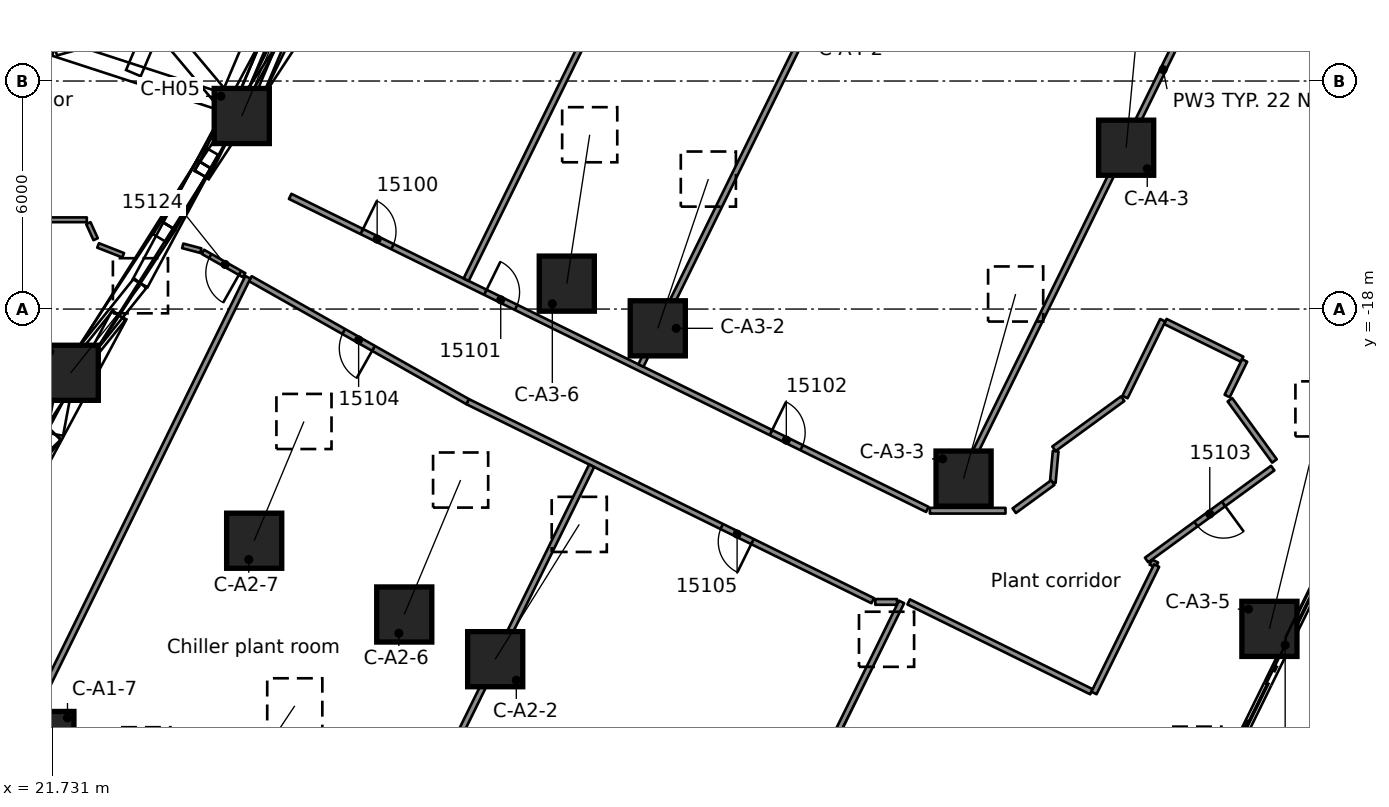
"""IFC4 building model, lengths in metres.
Left out: names, types, materials, properties, quantities, classifications, styles, units other than length and angle.
Written with IfcOpenShell. Run it as: python <this file> out.ifc"""

import sys

from ifc_helpers import new_model, si_unit, direction, frame, frame_2d, origin, origin_2d, place, context, subcontext, project, spatial, rectangle, extrude, element, fill, save


model = new_model("IFC4")
c1 = context("Model", 3, precision=1e-05, world=origin(), true_north=direction((0.0, 1.0)))
c2 = subcontext(c1, "Body", "Model", "MODEL_VIEW")
j1 = project(units=[si_unit("LENGTHUNIT", "METRE"), si_unit("PLANEANGLEUNIT", "RADIAN")], contexts=[c1])
p1 = place(None, origin())
s1 = spatial("IfcSite", under=j1, at=p1, CompositionType="ELEMENT")
p2 = place(p1, origin())
s2 = spatial("IfcBuilding", under=s1, at=p2, CompositionType="ELEMENT")
p3 = place(p2, frame((0.0, 0.0, 76.3)))
s3 = spatial("IfcBuildingStorey", under=s2, at=p3, CompositionType="ELEMENT", Elevation=76.3)
p4 = place(p3, frame((26.066, -31.518, 0.539), z_axis=(0.412094939361, 0.619345928653, 0.668272685072), x_axis=(-0.832547748734, 0.553953288716, 0.0)))
e1 = element("IfcColumn", 1, at=p4, inside=s3, PredefinedType="COLUMN", context=c2, shape_type="SweptSolid", body=[
    extrude(rectangle(XDim=1.45, YDim=1.45, at=origin_2d()), origin(), (0.0, 0.0, 1.0), 4.97),
])
p5 = place(p3, frame((21.578, -29.313, 0.425), z_axis=(0.579058536629, -0.094690218571, 0.809768469172), x_axis=(0.161380983903, 0.986892181565, 0.0)))
e2 = element("IfcColumn", 2, at=p5, inside=s3, PredefinedType="COLUMN", context=c2, shape_type="SweptSolid", body=[
    extrude(rectangle(XDim=1.45, YDim=1.45, at=origin_2d()), origin(), (0.0, 0.0, 1.0), 4.383),
])
p6 = place(p3, frame((33.388, -27.213, 0.572), z_axis=(0.417502902057, 0.669405381424, 0.614481702001), x_axis=(-0.848496661311, 0.529200732939, 0.0)))
e3 = element("IfcColumn", 3, at=p6, inside=s3, PredefinedType="COLUMN", context=c2, shape_type="SweptSolid", body=[
    extrude(rectangle(XDim=1.45, YDim=1.45, at=origin_2d()), origin(), (0.0, 0.0, 1.0), 5.299),
])
p7 = place(p3, frame((41.436, -31.167, 0.612), z_axis=(0.379249735907, 0.754795861111, 0.5352128977), x_axis=(-0.893548583897, 0.448966511241, 0.0)))
e4 = element("IfcColumn", 4, at=p7, inside=s3, PredefinedType="COLUMN", context=c2, shape_type="SweptSolid", body=[
    extrude(rectangle(XDim=1.45, YDim=1.45, at=origin_2d()), origin(), (0.0, 0.0, 1.0), 5.933),
])
p8 = place(p3, frame((30.995, -26.037, 0.55), z_axis=(0.293015861637, 0.699108637939, 0.652218381517), x_axis=(-0.922269042928, 0.386548590032, 0.0)))
e5 = element("IfcColumn", 5, at=p8, inside=s3, PredefinedType="COLUMN", context=c2, shape_type="SweptSolid", body=[
    extrude(rectangle(XDim=1.45, YDim=1.45, at=origin_2d()), origin(), (0.0, 0.0, 1.0), 5.061),
])
p9 = place(p3, frame((27.046, -24.096, 0.515), z_axis=(0.273638788717, 0.655437821725, 0.703933999152), x_axis=(-0.922806926199, 0.38526273757, 0.0)))
e6 = element("IfcColumn", 6, at=p9, inside=s3, PredefinedType="COLUMN", context=c2, shape_type="SweptSolid", body=[
    extrude(rectangle(XDim=1.45, YDim=1.45, at=origin_2d()), origin(), (0.0, 0.0, 1.0), 4.788),
])
p10 = place(p3, frame((37.666, -18.507, 0.57), z_axis=(0.252347690402, 0.744499743234, 0.618094471318), x_axis=(-0.947075588551, 0.321010637785, 0.0)))
e7 = element("IfcColumn", 7, at=p10, inside=s3, PredefinedType="COLUMN", context=c2, shape_type="SweptSolid", body=[
    extrude(rectangle(XDim=1.45, YDim=1.45, at=origin_2d()), origin(), (0.0, 0.0, 1.0), 5.275),
])
p11 = place(p3, frame((45.713, -22.461, 0.614), z_axis=(0.229855301875, 0.814814927922, 0.532205950207), x_axis=(-0.962438656011, 0.27149923281, 0.0)))
e8 = element("IfcColumn", 8, at=p11, inside=s3, PredefinedType="COLUMN", context=c2, shape_type="SweptSolid", body=[
    extrude(rectangle(XDim=1.45, YDim=1.45, at=origin_2d()), origin(), (0.0, 0.0, 1.0), 5.961),
])
p12 = place(p3, frame((53.761, -26.415, 0.642), z_axis=(0.209585713047, 0.861004693278, 0.463405596686), x_axis=(-0.971628161039, 0.236513671223, 0.0)))
e9 = element("IfcColumn", 9, at=p12, inside=s3, PredefinedType="COLUMN", context=c2, shape_type="SweptSolid", body=[
    extrude(rectangle(XDim=1.45, YDim=1.45, at=origin_2d()), origin(), (0.0, 0.0, 1.0), 6.722),
])
p13 = place(p3, frame((35.272, -17.331, 0.558), z_axis=(0.117156658899, 0.761186259922, 0.637863461081), x_axis=(-0.988361727552, 0.152121975764, 0.0)))
e10 = element("IfcColumn", 10, at=p13, inside=s3, PredefinedType="COLUMN", context=c2, shape_type="SweptSolid", body=[
    extrude(rectangle(XDim=1.45, YDim=1.45, at=origin_2d()), origin(), (0.0, 0.0, 1.0), 5.147),
])
p14 = place(p3, frame((49.991, -13.755, 0.622), z_axis=(0.07971925986, 0.853708499253, 0.514613095354), x_axis=(-0.995668399725, 0.092975468748, 0.0)))
e11 = element("IfcColumn", 11, at=p14, inside=s3, PredefinedType="COLUMN", context=c2, shape_type="SweptSolid", body=[
    extrude(rectangle(XDim=1.45, YDim=1.45, at=origin_2d()), origin(), (0.0, 0.0, 1.0), 6.134),
])
p15 = place(p3, frame((26.719, -12.92, 0.469), z_axis=(0.252280476656, 0.595306617304, 0.762866038366), x_axis=(-0.920733990351, 0.390190875101, 0.0)))
e12 = element("IfcColumn", 12, at=p15, inside=s3, PredefinedType="COLUMN", context=c2, shape_type="SweptSolid", body=[
    extrude(rectangle(XDim=1.45, YDim=1.45, at=origin_2d()), origin(), (0.0, 0.0, 1.0), 4.539),
])
p16 = place(p3, frame((22.219, -19.677, 0.469), z_axis=(0.404114198636, 0.504604790097, 0.762932316967), x_axis=(-0.780543967772, 0.625100883358, 0.0)))
e13 = element("IfcColumn", 13, at=p16, inside=s3, PredefinedType="COLUMN", context=c2, shape_type="SweptSolid", body=[
    extrude(rectangle(XDim=1.45, YDim=1.45, at=origin_2d()), origin(), (0.0, 0.0, 1.0), 4.538),
])
p17 = place(p3, frame((22.682, -15.739, 0.0), z_axis=(0.0, 0.0, 1.0), x_axis=(0.413486242538, -0.910510366351, 0.0)))
e14 = element("IfcWall", 14, at=p17, inside=s3, PredefinedType="PARTITIONING", context=c2, shape_type="SweptSolid", body=[
    extrude(rectangle(XDim=0.465, YDim=0.125, at=frame_2d((0.232, 0.0))), origin(), (0.0, 0.0, 1.0), 3.98),
])
p18 = place(p3, frame((53.894, -21.997, 0.0), z_axis=(0.0, 0.0, 1.0), x_axis=(-0.588776759567, 0.808295693044, 0.0)))
e15 = element("IfcWall", 15, at=p18, inside=s3, PredefinedType="PARTITIONING", context=c2, shape_type="SweptSolid", body=[
    extrude(rectangle(XDim=1.991, YDim=0.15, at=frame_2d((0.995, 0.0))), origin(), (0.0, 0.0, 1.0), 3.98),
])
p19 = place(p3, frame((48.136, -21.739, 0.0), z_axis=(0.0, 0.0, 1.0), x_axis=(-0.091330059121, -0.995820676779, 0.0)))
e16 = element("IfcWall", 16, at=p19, inside=s3, PredefinedType="PARTITIONING", context=c2, shape_type="SweptSolid", body=[
    extrude(rectangle(XDim=0.831, YDim=0.15, at=frame_2d((0.416, 0.0))), origin(), (0.0, 0.0, 1.0), 3.98),
])
p20 = place(p3, frame((26.782, -17.11, 0.0), z_axis=(0.0, 0.0, 1.0), x_axis=(-0.869921591707, 0.493190048847, 0.0)))
e17 = element("IfcWall", 17, at=p20, inside=s3, PredefinedType="PARTITIONING", context=c2, shape_type="SweptSolid", body=[
    extrude(rectangle(XDim=1.25, YDim=0.125, at=frame_2d((0.625, 0.0))), origin(), (0.0, 0.0, 1.0), 3.98),
])
p21 = place(p20, frame((0.125, 0.0, 0.0)))
e18 = element("IfcOpeningElement", 18, at=p21, cuts=e17, PredefinedType="OPENING", context=c2, shape_type="SweptSolid", body=[
    extrude(rectangle(XDim=0.9, YDim=2.1, at=frame_2d((0.45, 1.05))), frame((0.0, 0.073, 0.0), z_axis=(0.0, -1.0, 0.0), x_axis=(1.0, 0.0, 0.0)), (0.0, 0.0, 1.0), 0.145),
])
p22 = place(p3, frame((32.666, -20.438, 0.0), z_axis=(0.0, 0.0, 1.0), x_axis=(-0.870308211119, 0.4925074798, 0.0)))
e19 = element("IfcWall", 19, at=p22, inside=s3, PredefinedType="PARTITIONING", context=c2, shape_type="SweptSolid", body=[
    extrude(rectangle(XDim=6.575, YDim=0.15, at=frame_2d((3.287, 0.0))), origin(), (0.0, 0.0, 1.0), 3.98),
])
p23 = place(p22, frame((2.85, 0.0, 0.0)))
e20 = element("IfcOpeningElement", 20, at=p23, cuts=e19, PredefinedType="OPENING", context=c2, shape_type="SweptSolid", body=[
    extrude(rectangle(XDim=0.9, YDim=2.1, at=frame_2d((0.45, 1.05))), frame((0.0, 0.085, 0.0), z_axis=(0.0, -1.0, 0.0), x_axis=(1.0, 0.0, 0.0)), (0.0, 0.0, 1.0), 0.17),
])
p24 = place(p3, frame((43.321, -25.673, 0.0), z_axis=(0.0, 0.0, 1.0), x_axis=(-0.897519057595, 0.440975669684, 0.0)))
e21 = element("IfcWall", 21, at=p24, inside=s3, PredefinedType="PARTITIONING", context=c2, shape_type="SweptSolid", body=[
    extrude(rectangle(XDim=11.872, YDim=0.15, at=frame_2d((5.936, 0.0))), origin(), (0.0, 0.0, 1.0), 3.98),
])
p25 = place(p24, frame((3.525, 0.0, 0.0)))
e22 = element("IfcOpeningElement", 22, at=p25, cuts=e21, PredefinedType="OPENING", context=c2, shape_type="SweptSolid", body=[
    extrude(rectangle(XDim=0.9, YDim=2.1, at=frame_2d((0.45, 1.05))), frame((0.0, 0.085, 0.0), z_axis=(0.0, -1.0, 0.0), x_axis=(1.0, 0.0, 0.0)), (0.0, 0.0, 1.0), 0.17),
])
p26 = place(p3, frame((44.268, -25.706, 0.0), z_axis=(0.0, 0.0, 1.0), x_axis=(0.897495161726, -0.441024301688, 0.0)))
e23 = element("IfcWall", 23, at=p26, inside=s3, PredefinedType="PARTITIONING", context=c2, shape_type="SweptSolid", body=[
    extrude(rectangle(XDim=5.358, YDim=0.15, at=frame_2d((2.679, 0.0))), origin(), (0.0, 0.0, 1.0), 3.98),
])
p27 = place(p3, frame((27.993, -15.035, 0.0), z_axis=(0.0, 0.0, 1.0), x_axis=(0.897531550108, -0.440950242728, 0.0)))
e24 = element("IfcWall", 24, at=p27, inside=s3, PredefinedType="PARTITIONING", context=c2, shape_type="SweptSolid", body=[
    extrude(rectangle(XDim=18.68, YDim=0.15, at=frame_2d((9.34, 0.0))), origin(), (0.0, 0.0, 1.0), 3.98),
])
p28 = place(p27, frame((2.1, 0.0, 0.0)))
e25 = element("IfcOpeningElement", 25, at=p28, cuts=e24, PredefinedType="OPENING", context=c2, shape_type="SweptSolid", body=[
    extrude(rectangle(XDim=0.9, YDim=2.1, at=frame_2d((0.45, 1.05))), frame((0.0, 0.085, 0.0), z_axis=(0.0, -1.0, 0.0), x_axis=(1.0, 0.0, 0.0)), (0.0, 0.0, 1.0), 0.17),
])
p29 = place(p27, frame((5.723, 0.0, 0.0)))
e26 = element("IfcOpeningElement", 26, at=p29, cuts=e24, PredefinedType="OPENING", context=c2, shape_type="SweptSolid", body=[
    extrude(rectangle(XDim=0.9, YDim=2.1, at=frame_2d((0.45, 1.05))), frame((0.0, 0.085, 0.0), z_axis=(0.0, -1.0, 0.0), x_axis=(1.0, 0.0, 0.0)), (0.0, 0.0, 1.0), 0.17),
])
p30 = place(p27, frame((14.096, 0.0, 0.0)))
e27 = element("IfcOpeningElement", 27, at=p30, cuts=e24, PredefinedType="OPENING", context=c2, shape_type="SweptSolid", body=[
    extrude(rectangle(XDim=0.9, YDim=2.1, at=frame_2d((0.45, 1.05))), frame((0.0, 0.085, 0.0), z_axis=(0.0, -1.0, 0.0), x_axis=(1.0, 0.0, 0.0)), (0.0, 0.0, 1.0), 0.17),
])
p31 = place(p3, frame((51.022, -18.327, 0.0), z_axis=(0.0, 0.0, 1.0), x_axis=(0.897400657945, -0.441216567141, 0.0)))
e28 = element("IfcWall", 28, at=p31, inside=s3, PredefinedType="PARTITIONING", context=c2, shape_type="SweptSolid", body=[
    extrude(rectangle(XDim=2.251, YDim=0.15, at=frame_2d((1.125, 0.0))), origin(), (0.0, 0.0, 1.0), 3.98),
])
p32 = place(p3, frame((50.641, -24.659, 0.0), z_axis=(0.0, 0.0, 1.0), x_axis=(0.897476789299, -0.441061688054, 0.0)))
e29 = element("IfcWall", 29, at=p32, inside=s3, PredefinedType="PARTITIONING", context=c2, shape_type="SweptSolid", body=[
    extrude(rectangle(XDim=0.175, YDim=0.15, at=frame_2d((0.087, 0.0))), origin(), (0.0, 0.0, 1.0), 3.98),
])
p33 = place(p3, frame((22.938, -16.326, 0.0), z_axis=(0.0, 0.0, 1.0), x_axis=(0.931085434085, -0.36480119851, 0.0)))
e30 = element("IfcWall", 30, at=p33, inside=s3, PredefinedType="PARTITIONING", context=c2, shape_type="SweptSolid", body=[
    extrude(rectangle(XDim=0.71, YDim=0.125, at=frame_2d((0.355, 0.0))), origin(), (0.0, 0.0, 1.0), 3.98),
])
p34 = place(p3, frame((25.165, -16.337, 0.0), z_axis=(0.0, 0.0, 1.0), x_axis=(0.966726866197, -0.255810801517, 0.0)))
e31 = element("IfcWall", 31, at=p34, inside=s3, PredefinedType="PARTITIONING", context=c2, shape_type="SweptSolid", body=[
    extrude(rectangle(XDim=0.492, YDim=0.125, at=frame_2d((0.246, 0.0))), origin(), (0.0, 0.0, 1.0), 3.98),
])
p35 = place(p3, frame((43.389, -25.706, 0.0), z_axis=(0.0, 0.0, 1.0), x_axis=(1.0, 0.0, 0.0)))
e32 = element("IfcWall", 32, at=p35, inside=s3, PredefinedType="PARTITIONING", context=c2, shape_type="SweptSolid", body=[
    extrude(rectangle(XDim=0.573, YDim=0.15, at=frame_2d((0.287, 0.0))), origin(), (0.0, 0.0, 1.0), 3.98),
])
p36 = place(p3, frame((44.826, -23.306, 0.0), z_axis=(0.0, 0.0, 1.0), x_axis=(1.0, 0.0, 0.0)))
e33 = element("IfcWall", 33, at=p36, inside=s3, PredefinedType="PARTITIONING", context=c2, shape_type="SweptSolid", body=[
    extrude(rectangle(XDim=1.99, YDim=0.15, at=frame_2d((0.995, 0.0))), origin(), (0.0, 0.0, 1.0), 3.98),
])
p37 = place(p3, frame((22.642, -15.651, 0.0), z_axis=(0.0, 0.0, 1.0), x_axis=(-1.0, 0.0, 0.0)))
e34 = element("IfcWall", 34, at=p37, inside=s3, PredefinedType="PARTITIONING", context=c2, shape_type="SweptSolid", body=[
    extrude(rectangle(XDim=10.482, YDim=0.125, at=frame_2d((5.241, 0.0))), origin(), (0.0, 0.0, 1.0), 3.98),
])
p38 = place(p37, frame((4.35, 0.0, 0.0)))
e35 = element("IfcOpeningElement", 35, at=p38, cuts=e34, PredefinedType="OPENING", context=c2, shape_type="SweptSolid", body=[
    extrude(rectangle(XDim=1.8, YDim=2.1, at=frame_2d((0.9, 1.05))), frame((0.0, 0.073, 0.0), z_axis=(0.0, -1.0, 0.0), x_axis=(1.0, 0.0, 0.0)), (0.0, 0.0, 1.0), 0.145),
])
p39 = place(p3, frame((53.848, -22.185, 0.0), z_axis=(0.0, 0.0, 1.0), x_axis=(-0.8081289685, -0.589005577453, 0.0)))
e36 = element("IfcWall", 36, at=p39, inside=s3, PredefinedType="PARTITIONING", context=c2, shape_type="SweptSolid", body=[
    extrude(rectangle(XDim=4.107, YDim=0.15, at=frame_2d((2.053, 0.0))), origin(), (0.0, 0.0, 1.0), 3.98),
])
p40 = place(p39, frame((1.6, 0.0, 0.0)))
e37 = element("IfcOpeningElement", 37, at=p40, cuts=e36, PredefinedType="OPENING", context=c2, shape_type="SweptSolid", body=[
    extrude(rectangle(XDim=0.9, YDim=2.1, at=frame_2d((0.45, 1.05))), frame((0.0, 0.085, 0.0), z_axis=(0.0, -1.0, 0.0), x_axis=(1.0, 0.0, 0.0)), (0.0, 0.0, 1.0), 0.17),
])
p41 = place(p3, frame((47.046, -23.306, 0.0), z_axis=(0.0, 0.0, 1.0), x_axis=(0.808188872435, 0.588923379119, 0.0)))
e38 = element("IfcWall", 38, at=p41, inside=s3, PredefinedType="PARTITIONING", context=c2, shape_type="SweptSolid", body=[
    extrude(rectangle(XDim=1.255, YDim=0.15, at=frame_2d((0.627, 0.0))), origin(), (0.0, 0.0, 1.0), 3.98),
])
p42 = place(p3, frame((48.092, -21.677, 0.0), z_axis=(0.0, 0.0, 1.0), x_axis=(0.808032420816, 0.589138020255, 0.0)))
e39 = element("IfcWall", 39, at=p42, inside=s3, PredefinedType="PARTITIONING", context=c2, shape_type="SweptSolid", body=[
    extrude(rectangle(XDim=2.237, YDim=0.15, at=frame_2d((1.119, 0.0))), origin(), (0.0, 0.0, 1.0), 3.98),
])
p43 = place(p3, frame((49.144, -28.102, 0.0), z_axis=(0.0, 0.0, 1.0), x_axis=(0.441190229138, 0.897413606824, 0.0)))
e40 = element("IfcWall", 40, at=p43, inside=s3, PredefinedType="PARTITIONING", context=c2, shape_type="SweptSolid", body=[
    extrude(rectangle(XDim=3.735, YDim=0.15, at=frame_2d((1.868, 0.0))), origin(), (0.0, 0.0, 1.0), 3.98),
])
p44 = place(p3, frame((52.649, -20.288, 0.0), z_axis=(0.0, 0.0, 1.0), x_axis=(0.441393879012, 0.897313458926, 0.0)))
e41 = element("IfcWall", 41, at=p44, inside=s3, PredefinedType="PARTITIONING", context=c2, shape_type="SweptSolid", body=[
    extrude(rectangle(XDim=1.042, YDim=0.15, at=frame_2d((0.521, 0.0))), origin(), (0.0, 0.0, 1.0), 3.98),
])
p45 = place(p3, frame((49.961, -20.315, 0.0), z_axis=(0.0, 0.0, 1.0), x_axis=(0.441216567141, 0.897400657945, 0.0)))
e42 = element("IfcWall", 42, at=p45, inside=s3, PredefinedType="PARTITIONING", context=c2, shape_type="SweptSolid", body=[
    extrude(rectangle(XDim=2.251, YDim=0.15, at=frame_2d((1.125, 0.0))), origin(), (0.0, 0.0, 1.0), 3.98),
])
p46 = place(p3, frame((36.754, -40.62, 0.0), z_axis=(0.0, 0.0, 1.0), x_axis=(0.440996903933, 0.897508624316, 0.0)))
e43 = element("IfcWall", 43, at=p46, inside=s3, PredefinedType="PARTITIONING", context=c2, shape_type="SweptSolid", body=[
    extrude(rectangle(XDim=16.617, YDim=0.15, at=frame_2d((8.309, 0.0))), origin(), (0.0, 0.0, 1.0), 3.98),
])
p47 = place(p3, frame((45.314, -23.198, 0.0), z_axis=(0.0, 0.0, 1.0), x_axis=(0.441005817264, 0.897504244636, 0.0)))
e44 = element("IfcWall", 44, at=p47, inside=s3, PredefinedType="PARTITIONING", context=c2, shape_type="SweptSolid", body=[
    extrude(rectangle(XDim=25.623, YDim=0.15, at=frame_2d((12.812, 0.0))), origin(), (0.0, 0.0, 1.0), 3.98),
])
p48 = place(p3, frame((28.766, -36.695, 0.0), z_axis=(0.0, 0.0, 1.0), x_axis=(0.440989524677, 0.897512250125, 0.0)))
e45 = element("IfcWall", 45, at=p48, inside=s3, PredefinedType="PARTITIONING", context=c2, shape_type="SweptSolid", body=[
    extrude(rectangle(XDim=16.236, YDim=0.15, at=frame_2d((8.118, 0.0))), origin(), (0.0, 0.0, 1.0), 3.98),
])
p49 = place(p3, frame((37.222, -19.486, 0.0), z_axis=(0.0, 0.0, 1.0), x_axis=(0.440971293859, 0.897521207545, 0.0)))
e46 = element("IfcWall", 46, at=p49, inside=s3, PredefinedType="PARTITIONING", context=c2, shape_type="SweptSolid", body=[
    extrude(rectangle(XDim=25.592, YDim=0.15, at=frame_2d((12.796, 0.0))), origin(), (0.0, 0.0, 1.0), 3.98),
])
p50 = place(p3, frame((32.624, -17.227, 0.0), z_axis=(0.0, 0.0, 1.0), x_axis=(0.440938270509, 0.897537431866, 0.0)))
e47 = element("IfcWall", 47, at=p50, inside=s3, PredefinedType="PARTITIONING", context=c2, shape_type="SweptSolid", body=[
    extrude(rectangle(XDim=25.083, YDim=0.15, at=frame_2d((12.542, 0.0))), origin(), (0.0, 0.0, 1.0), 3.98),
])
p51 = place(p3, frame((19.515, -32.15, 0.0), z_axis=(0.0, 0.0, 1.0), x_axis=(0.44100368403, 0.897505292838, 0.0)))
e48 = element("IfcWall", 48, at=p51, inside=s3, PredefinedType="PARTITIONING", context=c2, shape_type="SweptSolid", body=[
    extrude(rectangle(XDim=16.698, YDim=0.15, at=frame_2d((8.349, 0.0))), origin(), (0.0, 0.0, 1.0), 3.98),
])
p52 = place(p28, origin())
e49 = element("IfcDoor", 49, at=p52, inside=s3, OperationType="SINGLE_SWING_LEFT", PredefinedType="DOOR", context=c2, shape_type="SweptSolid", body=[
    extrude(rectangle(XDim=0.9, YDim=2.1, at=frame_2d((0.45, 1.05))), frame((0.0, 0.025, 0.0), z_axis=(0.0, -1.0, 0.0), x_axis=(1.0, 0.0, 0.0)), (0.0, 0.0, 1.0), 0.05),
])
fill(e25, e49)
p53 = place(p29, origin())
e50 = element("IfcDoor", 50, at=p53, inside=s3, OperationType="SINGLE_SWING_LEFT", PredefinedType="DOOR", context=c2, shape_type="SweptSolid", body=[
    extrude(rectangle(XDim=0.9, YDim=2.1, at=frame_2d((0.45, 1.05))), frame((0.0, 0.025, 0.0), z_axis=(0.0, -1.0, 0.0), x_axis=(1.0, 0.0, 0.0)), (0.0, 0.0, 1.0), 0.05),
])
fill(e26, e50)
p54 = place(p30, origin())
e51 = element("IfcDoor", 51, at=p54, inside=s3, OperationType="SINGLE_SWING_RIGHT", PredefinedType="DOOR", context=c2, shape_type="SweptSolid", body=[
    extrude(rectangle(XDim=0.9, YDim=2.1, at=frame_2d((0.45, 1.05))), frame((0.0, 0.025, 0.0), z_axis=(0.0, -1.0, 0.0), x_axis=(1.0, 0.0, 0.0)), (0.0, 0.0, 1.0), 0.05),
])
fill(e27, e51)
p55 = place(p40, origin())
e52 = element("IfcDoor", 52, at=p55, inside=s3, OperationType="SINGLE_SWING_LEFT", PredefinedType="DOOR", context=c2, shape_type="SweptSolid", body=[
    extrude(rectangle(XDim=0.9, YDim=2.1, at=frame_2d((0.45, 1.05))), frame((0.0, 0.025, 0.0), z_axis=(0.0, -1.0, 0.0), x_axis=(1.0, 0.0, 0.0)), (0.0, 0.0, 1.0), 0.05),
])
fill(e37, e52)
p56 = place(p23, origin())
e53 = element("IfcDoor", 53, at=p56, inside=s3, OperationType="SINGLE_SWING_RIGHT", PredefinedType="DOOR", context=c2, shape_type="SweptSolid", body=[
    extrude(rectangle(XDim=0.9, YDim=2.1, at=frame_2d((0.45, 1.05))), frame((0.0, 0.025, 0.0), z_axis=(0.0, -1.0, 0.0), x_axis=(1.0, 0.0, 0.0)), (0.0, 0.0, 1.0), 0.05),
])
fill(e20, e53)
p57 = place(p25, origin())
e54 = element("IfcDoor", 54, at=p57, inside=s3, OperationType="SINGLE_SWING_LEFT", PredefinedType="DOOR", context=c2, shape_type="SweptSolid", body=[
    extrude(rectangle(XDim=0.9, YDim=2.1, at=frame_2d((0.45, 1.05))), frame((0.0, 0.025, 0.0), z_axis=(0.0, -1.0, 0.0), x_axis=(1.0, 0.0, 0.0)), (0.0, 0.0, 1.0), 0.05),
])
fill(e22, e54)
p58 = place(p21, origin())
e55 = element("IfcDoor", 55, at=p58, inside=s3, OperationType="SINGLE_SWING_LEFT", PredefinedType="DOOR", context=c2, shape_type="SweptSolid", body=[
    extrude(rectangle(XDim=0.9, YDim=2.1, at=frame_2d((0.45, 1.05))), frame((0.0, 0.025, 0.0), z_axis=(0.0, -1.0, 0.0), x_axis=(1.0, 0.0, 0.0)), (0.0, 0.0, 1.0), 0.05),
])
fill(e18, e55)
save(model, sys.argv[1])
